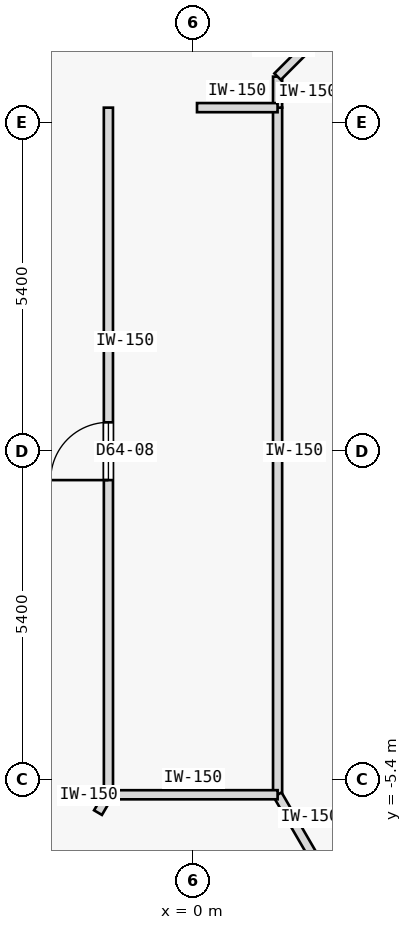
"""IFC4 building model, lengths in metres.
Left out: names, types, materials, properties, quantities, classifications, styles, units other than length and angle.
Written with IfcOpenShell. Run it as: python <this file> out.ifc"""

import sys

from ifc_helpers import new_model, si_unit, direction, frame, frame_2d, origin, place, context, subcontext, project, spatial, rectangle, extrude, element, fill, save


model = new_model("IFC4")
c1 = context("Model", 3, precision=1e-05, world=origin(), true_north=direction((0.0, 1.0)))
c2 = subcontext(c1, "Body", "Model", "MODEL_VIEW")
j1 = project(units=[si_unit("LENGTHUNIT", "METRE"), si_unit("PLANEANGLEUNIT", "RADIAN")], contexts=[c1])
p1 = place(None, origin())
s1 = spatial("IfcSite", under=j1, at=p1, CompositionType="ELEMENT")
p2 = place(p1, origin())
s2 = spatial("IfcBuilding", under=s1, at=p2, CompositionType="ELEMENT")
p3 = place(p2, frame((0.0, 0.0, 241.05)))
s3 = spatial("IfcBuildingStorey", under=s2, at=p3, CompositionType="ELEMENT", Elevation=241.05)
p4 = place(p3, frame((-1.391, -5.65, 0.0), z_axis=(0.0, 0.0, 1.0), x_axis=(-8.6422954e-05, 0.999999996266, 0.0)))
e1 = element("IfcWall", 1, at=p4, inside=s3, PredefinedType="PARTITIONING", context=c2, shape_type="SweptSolid", body=[
    extrude(rectangle(XDim=11.3, YDim=0.15, at=frame_2d((5.65, 0.0))), origin(), (0.0, 0.0, 1.0), 3.125),
])
p5 = place(p4, frame((5.175, 0.0, 0.0)))
e2 = element("IfcOpeningElement", 2, at=p5, cuts=e1, PredefinedType="OPENING", context=c2, shape_type="SweptSolid", body=[
    extrude(rectangle(XDim=0.95, YDim=2.15, at=frame_2d((0.475, 1.075))), frame((0.0, 0.085, 0.0), z_axis=(0.0, -1.0, 0.0), x_axis=(1.0, 0.0, 0.0)), (0.0, 0.0, 1.0), 0.17),
])
p6 = place(p3, frame((1.391, -5.648, 0.0), z_axis=(0.0, 0.0, 1.0), x_axis=(-4.3218947e-05, 0.999999999066, 0.0)))
e3 = element("IfcWall", 3, at=p6, inside=s3, PredefinedType="PARTITIONING", context=c2, shape_type="SweptSolid", body=[
    extrude(rectangle(XDim=11.298, YDim=0.15, at=frame_2d((5.649, 0.0))), origin(), (0.0, 0.0, 1.0), 3.125),
])
p7 = place(p3, frame((-1.562, -5.944, 0.0), z_axis=(0.0, 0.0, 1.0), x_axis=(0.505387839696, 0.862892305845, 0.0)))
e4 = element("IfcWall", 4, at=p7, inside=s3, PredefinedType="PARTITIONING", context=c2, shape_type="SweptSolid", body=[
    extrude(rectangle(XDim=0.34, YDim=0.15, at=frame_2d((0.17, 0.0))), origin(), (0.0, 0.0, 1.0), 3.125),
])
p8 = place(p3, frame((1.391, -5.649, 0.0), z_axis=(0.0, 0.0, 1.0), x_axis=(0.502522642426, -0.864564048437, 0.0)))
e5 = element("IfcWall", 5, at=p8, inside=s3, PredefinedType="PARTITIONING", context=c2, shape_type="SweptSolid", body=[
    extrude(rectangle(XDim=1.171, YDim=0.15, at=frame_2d((0.586, 0.0))), origin(), (0.0, 0.0, 1.0), 3.125),
])
p9 = place(p3, frame((1.391, 5.649, 0.0), z_axis=(0.0, 0.0, 1.0), x_axis=(0.000957395444, 0.999999541697, 0.0)))
e6 = element("IfcWall", 6, at=p9, inside=s3, PredefinedType="PARTITIONING", context=c2, shape_type="SweptSolid", body=[
    extrude(rectangle(XDim=0.51, YDim=0.15, at=frame_2d((0.255, 0.0))), origin(), (0.0, 0.0, 1.0), 3.125),
])
p10 = place(p3, frame((1.391, 6.159, 0.0), z_axis=(0.0, 0.0, 1.0), x_axis=(0.707106781187, 0.707106781187, 0.0)))
e7 = element("IfcWall", 7, at=p10, inside=s3, PredefinedType="PARTITIONING", context=c2, shape_type="SweptSolid", body=[
    extrude(rectangle(XDim=0.833, YDim=0.15, at=frame_2d((0.417, 0.0))), origin(), (0.0, 0.0, 1.0), 3.125),
])
p11 = place(p3, frame((-1.391, -5.65, 0.0), z_axis=(0.0, 0.0, 1.0), x_axis=(0.999999965344, 0.000263273356, 0.0)))
e8 = element("IfcWall", 8, at=p11, inside=s3, PredefinedType="PARTITIONING", context=c2, shape_type="SweptSolid", body=[
    extrude(rectangle(XDim=2.782, YDim=0.15, at=frame_2d((1.391, 0.0))), origin(), (0.0, 0.0, 1.0), 3.125),
])
p12 = place(p3, frame((0.066, 5.65, 0.0), z_axis=(0.0, 0.0, 1.0), x_axis=(0.999999932094, -0.000368527707, 0.0)))
e9 = element("IfcWall", 9, at=p12, inside=s3, PredefinedType="PARTITIONING", context=c2, shape_type="SweptSolid", body=[
    extrude(rectangle(XDim=1.325, YDim=0.15, at=frame_2d((0.663, 0.0))), origin(), (0.0, 0.0, 1.0), 3.125),
])
p13 = place(p5, origin())
e10 = element("IfcDoor", 10, at=p13, inside=s3, OperationType="SINGLE_SWING_LEFT", PredefinedType="DOOR", context=c2, shape_type="SweptSolid", body=[
    extrude(rectangle(XDim=0.95, YDim=2.15, at=frame_2d((0.475, 1.075))), frame((0.0, 0.025, 0.0), z_axis=(0.0, -1.0, 0.0), x_axis=(1.0, 0.0, 0.0)), (0.0, 0.0, 1.0), 0.05),
])
fill(e2, e10)
save(model, sys.argv[1])
